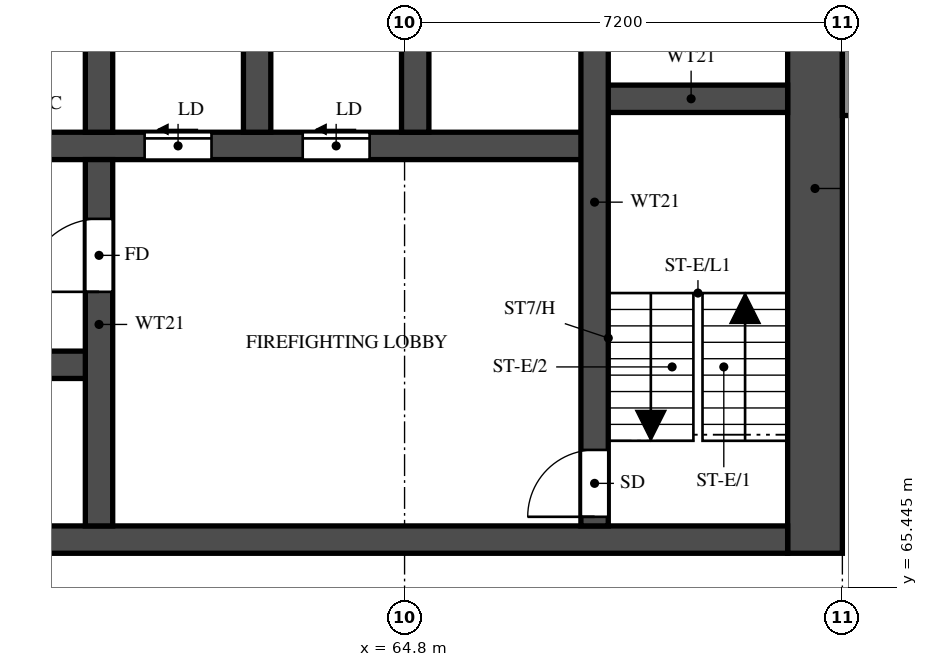
"""IFC4 building model, lengths in metres.
Left out: names, types, materials, properties, quantities, classifications, styles, units other than length and angle.
Written with IfcOpenShell. Run it as: python <this file> out.ifc"""

import sys

from ifc_helpers import new_model, si_unit, direction, frame, frame_2d, origin, place, context, subcontext, project, spatial, rectangle, extrude, element, fill, save


model = new_model("IFC4")
c1 = context("Model", 3, precision=1e-05, world=origin(), true_north=direction((0.0, 1.0)))
c2 = subcontext(c1, "Body", "Model", "MODEL_VIEW")
j1 = project(units=[si_unit("LENGTHUNIT", "METRE"), si_unit("PLANEANGLEUNIT", "RADIAN")], contexts=[c1])
p1 = place(None, origin())
s1 = spatial("IfcSite", under=j1, at=p1, CompositionType="ELEMENT")
p2 = place(p1, origin())
s2 = spatial("IfcBuilding", under=s1, at=p2, CompositionType="ELEMENT")
p3 = place(p2, frame((0.0, 0.0, 93.5)))
s3 = spatial("IfcBuildingStorey", under=s2, at=p3, CompositionType="ELEMENT", Elevation=93.5)
p4 = place(p3, frame((71.55, 66.0, 0.0), z_axis=(0.0, 0.0, 1.0), x_axis=(0.0, 1.0, 0.0)))
e1 = element("IfcWall", 1, at=p4, inside=s3, PredefinedType="SHEAR", context=c2, shape_type="SweptSolid", body=[
    extrude(rectangle(XDim=12.0, YDim=0.9, at=frame_2d((6.0, 0.0))), origin(), (0.0, 0.0, 1.0), 3.18),
])
p5 = place(p3, frame((29.7, 66.225, 0.0), z_axis=(0.0, 0.0, 1.0), x_axis=(1.0, 0.0, 0.0)))
e2 = element("IfcWall", 2, at=p5, inside=s3, PredefinedType="SHEAR", context=c2, shape_type="SweptSolid", body=[
    extrude(rectangle(XDim=41.4, YDim=0.45, at=frame_2d((20.7, 0.0))), origin(), (0.0, 0.0, 1.0), 3.18),
])
p6 = place(p5, frame((0.925, 0.0, 0.0)))
e3 = element("IfcOpeningElement", 3, at=p6, cuts=e2, PredefinedType="OPENING", context=c2, shape_type="SweptSolid", body=[
    extrude(rectangle(XDim=1.1, YDim=2.1, at=frame_2d((0.55, 1.05))), frame((0.0, 0.235, 0.0), z_axis=(0.0, -1.0, 0.0), x_axis=(1.0, 0.0, 0.0)), (0.0, 0.0, 1.0), 0.47),
])
p7 = place(p5, frame((3.738, 0.0, 0.0)))
e4 = element("IfcOpeningElement", 4, at=p7, cuts=e2, PredefinedType="OPENING", context=c2, shape_type="SweptSolid", body=[
    extrude(rectangle(XDim=1.8, YDim=2.1, at=frame_2d((0.9, 1.05))), frame((0.0, 0.235, 0.0), z_axis=(0.0, -1.0, 0.0), x_axis=(1.0, 0.0, 0.0)), (0.0, 0.0, 1.0), 0.47),
])
p8 = place(p3, frame((35.575, 69.1, 0.0), z_axis=(0.0, 0.0, 1.0), x_axis=(1.0, 0.0, 0.0)))
e5 = element("IfcWall", 5, at=p8, inside=s3, PredefinedType="SHEAR", context=c2, shape_type="SweptSolid", body=[
    extrude(rectangle(XDim=24.2, YDim=0.45, at=frame_2d((12.1, 0.0))), origin(), (0.0, 0.0, 1.0), 3.18),
])
p9 = place(p8, frame((1.05, 0.0, 0.0)))
e6 = element("IfcOpeningElement", 6, at=p9, cuts=e5, PredefinedType="OPENING", context=c2, shape_type="SweptSolid", body=[
    extrude(rectangle(XDim=1.1, YDim=2.1, at=frame_2d((0.55, 1.05))), frame((0.0, 0.235, 0.0), z_axis=(0.0, -1.0, 0.0), x_axis=(1.0, 0.0, 0.0)), (0.0, 0.0, 1.0), 0.47),
])
p10 = place(p8, frame((3.8, 0.0, 0.0)))
e7 = element("IfcOpeningElement", 7, at=p10, cuts=e5, PredefinedType="OPENING", context=c2, shape_type="SweptSolid", body=[
    extrude(rectangle(XDim=1.1, YDim=2.1, at=frame_2d((0.55, 1.05))), frame((0.0, 0.235, 0.0), z_axis=(0.0, -1.0, 0.0), x_axis=(1.0, 0.0, 0.0)), (0.0, 0.0, 1.0), 0.47),
])
p11 = place(p8, frame((6.55, 0.0, 0.0)))
e8 = element("IfcOpeningElement", 8, at=p11, cuts=e5, PredefinedType="OPENING", context=c2, shape_type="SweptSolid", body=[
    extrude(rectangle(XDim=1.1, YDim=2.1, at=frame_2d((0.55, 1.05))), frame((0.0, 0.235, 0.0), z_axis=(0.0, -1.0, 0.0), x_axis=(1.0, 0.0, 0.0)), (0.0, 0.0, 1.0), 0.47),
])
p12 = place(p8, frame((9.3, 0.0, 0.0)))
e9 = element("IfcOpeningElement", 9, at=p12, cuts=e5, PredefinedType="OPENING", context=c2, shape_type="SweptSolid", body=[
    extrude(rectangle(XDim=1.1, YDim=2.1, at=frame_2d((0.55, 1.05))), frame((0.0, 0.235, 0.0), z_axis=(0.0, -1.0, 0.0), x_axis=(1.0, 0.0, 0.0)), (0.0, 0.0, 1.0), 0.47),
])
p13 = place(p8, frame((12.05, 0.0, 0.0)))
e10 = element("IfcOpeningElement", 10, at=p13, cuts=e5, PredefinedType="OPENING", context=c2, shape_type="SweptSolid", body=[
    extrude(rectangle(XDim=1.1, YDim=2.1, at=frame_2d((0.55, 1.05))), frame((0.0, 0.235, 0.0), z_axis=(0.0, -1.0, 0.0), x_axis=(1.0, 0.0, 0.0)), (0.0, 0.0, 1.0), 0.47),
])
p14 = place(p8, frame((14.8, 0.0, 0.0)))
e11 = element("IfcOpeningElement", 11, at=p14, cuts=e5, PredefinedType="OPENING", context=c2, shape_type="SweptSolid", body=[
    extrude(rectangle(XDim=1.1, YDim=2.1, at=frame_2d((0.55, 1.05))), frame((0.0, 0.235, 0.0), z_axis=(0.0, -1.0, 0.0), x_axis=(1.0, 0.0, 0.0)), (0.0, 0.0, 1.0), 0.47),
])
p15 = place(p3, frame((32.875, 72.7, 0.0), z_axis=(0.0, 0.0, 1.0), x_axis=(1.0, 0.0, 0.0)))
e12 = element("IfcWall", 12, at=p15, inside=s3, PredefinedType="SHEAR", context=c2, shape_type="SweptSolid", body=[
    extrude(rectangle(XDim=35.05, YDim=0.45, at=frame_2d((17.525, 0.0))), origin(), (0.0, 0.0, 1.0), 3.18),
])
p16 = place(p15, frame((19.8, 0.0, 0.0)))
e13 = element("IfcOpeningElement", 13, at=p16, cuts=e12, PredefinedType="OPENING", context=c2, shape_type="SweptSolid", body=[
    extrude(rectangle(XDim=1.1, YDim=2.1, at=frame_2d((0.55, 1.05))), frame((0.0, 0.235, 0.0), z_axis=(0.0, -1.0, 0.0), x_axis=(1.0, 0.0, 0.0)), (0.0, 0.0, 1.0), 0.47),
])
p17 = place(p15, frame((27.65, 0.0, 0.0)))
e14 = element("IfcOpeningElement", 14, at=p17, cuts=e12, PredefinedType="OPENING", context=c2, shape_type="SweptSolid", body=[
    extrude(rectangle(XDim=1.1, YDim=2.1, at=frame_2d((0.55, 1.05))), frame((0.0, 0.235, 0.0), z_axis=(0.0, -1.0, 0.0), x_axis=(1.0, 0.0, 0.0)), (0.0, 0.0, 1.0), 0.47),
])
p18 = place(p15, frame((30.25, 0.0, 0.0)))
e15 = element("IfcOpeningElement", 15, at=p18, cuts=e12, PredefinedType="OPENING", context=c2, shape_type="SweptSolid", body=[
    extrude(rectangle(XDim=1.1, YDim=2.1, at=frame_2d((0.55, 1.05))), frame((0.0, 0.235, 0.0), z_axis=(0.0, -1.0, 0.0), x_axis=(1.0, 0.0, 0.0)), (0.0, 0.0, 1.0), 0.47),
])
p19 = place(p15, frame((3.75, 0.0, 0.0)))
e16 = element("IfcOpeningElement", 16, at=p19, cuts=e12, PredefinedType="OPENING", context=c2, shape_type="SweptSolid", body=[
    extrude(rectangle(XDim=1.1, YDim=2.1, at=frame_2d((0.55, 1.05))), frame((0.0, 0.235, 0.0), z_axis=(0.0, -1.0, 0.0), x_axis=(1.0, 0.0, 0.0)), (0.0, 0.0, 1.0), 0.47),
])
p20 = place(p15, frame((6.5, 0.0, 0.0)))
e17 = element("IfcOpeningElement", 17, at=p20, cuts=e12, PredefinedType="OPENING", context=c2, shape_type="SweptSolid", body=[
    extrude(rectangle(XDim=1.1, YDim=2.1, at=frame_2d((0.55, 1.05))), frame((0.0, 0.235, 0.0), z_axis=(0.0, -1.0, 0.0), x_axis=(1.0, 0.0, 0.0)), (0.0, 0.0, 1.0), 0.47),
])
p21 = place(p15, frame((9.25, 0.0, 0.0)))
e18 = element("IfcOpeningElement", 18, at=p21, cuts=e12, PredefinedType="OPENING", context=c2, shape_type="SweptSolid", body=[
    extrude(rectangle(XDim=1.1, YDim=2.1, at=frame_2d((0.55, 1.05))), frame((0.0, 0.235, 0.0), z_axis=(0.0, -1.0, 0.0), x_axis=(1.0, 0.0, 0.0)), (0.0, 0.0, 1.0), 0.47),
])
p22 = place(p15, frame((12.0, 0.0, 0.0)))
e19 = element("IfcOpeningElement", 19, at=p22, cuts=e12, PredefinedType="OPENING", context=c2, shape_type="SweptSolid", body=[
    extrude(rectangle(XDim=1.1, YDim=2.1, at=frame_2d((0.55, 1.05))), frame((0.0, 0.235, 0.0), z_axis=(0.0, -1.0, 0.0), x_axis=(1.0, 0.0, 0.0)), (0.0, 0.0, 1.0), 0.47),
])
p23 = place(p15, frame((14.75, 0.0, 0.0)))
e20 = element("IfcOpeningElement", 20, at=p23, cuts=e12, PredefinedType="OPENING", context=c2, shape_type="SweptSolid", body=[
    extrude(rectangle(XDim=1.1, YDim=2.1, at=frame_2d((0.55, 1.05))), frame((0.0, 0.235, 0.0), z_axis=(0.0, -1.0, 0.0), x_axis=(1.0, 0.0, 0.0)), (0.0, 0.0, 1.0), 0.47),
])
p24 = place(p15, frame((17.5, 0.0, 0.0)))
e21 = element("IfcOpeningElement", 21, at=p24, cuts=e12, PredefinedType="OPENING", context=c2, shape_type="SweptSolid", body=[
    extrude(rectangle(XDim=1.1, YDim=2.1, at=frame_2d((0.55, 1.05))), frame((0.0, 0.235, 0.0), z_axis=(0.0, -1.0, 0.0), x_axis=(1.0, 0.0, 0.0)), (0.0, 0.0, 1.0), 0.47),
])
p25 = place(p15, frame((0.913, 0.0, 0.0)))
e22 = element("IfcOpeningElement", 22, at=p25, cuts=e12, PredefinedType="OPENING", context=c2, shape_type="SweptSolid", body=[
    extrude(rectangle(XDim=1.1, YDim=2.1, at=frame_2d((0.55, 1.05))), frame((0.0, 0.235, 0.0), z_axis=(0.0, -1.0, 0.0), x_axis=(1.0, 0.0, 0.0)), (0.0, 0.0, 1.0), 0.47),
])
p26 = place(p3, frame((67.925, 73.475, 0.0), z_axis=(0.0, 0.0, 1.0), x_axis=(1.0, 0.0, 0.0)))
e23 = element("IfcWall", 23, at=p26, inside=s3, PredefinedType="SHEAR", context=c2, shape_type="SweptSolid", body=[
    extrude(rectangle(XDim=3.175, YDim=0.45, at=frame_2d((1.587, 0.0))), origin(), (0.0, 0.0, 1.0), 3.18),
])
p27 = place(p3, frame((67.925, 66.45, 0.0), z_axis=(0.0, 0.0, 1.0), x_axis=(0.0, 1.0, 0.0)))
e24 = element("IfcWall", 24, at=p27, inside=s3, PredefinedType="SHEAR", context=c2, shape_type="SweptSolid", body=[
    extrude(rectangle(XDim=10.65, YDim=0.45, at=frame_2d((5.325, 0.0))), origin(), (0.0, 0.0, 1.0), 3.18),
])
p28 = place(p27, frame((0.15, 0.0, 0.0)))
e25 = element("IfcOpeningElement", 25, at=p28, cuts=e24, PredefinedType="OPENING", context=c2, shape_type="SweptSolid", body=[
    extrude(rectangle(XDim=1.1, YDim=2.1, at=frame_2d((0.55, 1.05))), frame((0.0, 0.235, 0.0), z_axis=(0.0, -1.0, 0.0), x_axis=(1.0, 0.0, 0.0)), (0.0, 0.0, 1.0), 0.47),
])
p29 = place(p3, frame((59.775, 66.45, 0.0), z_axis=(0.0, 0.0, 1.0), x_axis=(0.0, 1.0, 0.0)))
e26 = element("IfcWall", 26, at=p29, inside=s3, PredefinedType="SHEAR", context=c2, shape_type="SweptSolid", body=[
    extrude(rectangle(XDim=6.025, YDim=0.45, at=frame_2d((3.013, 0.0))), origin(), (0.0, 0.0, 1.0), 3.18),
])
p30 = place(p29, frame((3.85, 0.0, 0.0)))
e27 = element("IfcOpeningElement", 27, at=p30, cuts=e26, PredefinedType="OPENING", context=c2, shape_type="SweptSolid", body=[
    extrude(rectangle(XDim=1.2, YDim=2.1, at=frame_2d((0.6, 1.05))), frame((0.0, 0.235, 0.0), z_axis=(0.0, -1.0, 0.0), x_axis=(1.0, 0.0, 0.0)), (0.0, 0.0, 1.0), 0.47),
])
for number, where, z_axis, x_axis in (
    (28, (59.775, 72.925, 0.0), (0.0, 0.0, 1.0), (0.0, 1.0, 0.0)),
    (29, (62.375, 72.925, 0.0), (0.0, 0.0, 1.0), (0.0, 1.0, 0.0)),
    (30, (64.975, 72.925, 0.0), (0.0, 0.0, 1.0), (0.0, 1.0, 0.0)),
):
    element("IfcWall", number, at=place(p3, frame(where, z_axis=z_axis, x_axis=x_axis)), inside=s3, PredefinedType="SHEAR", context=c2, shape_type="SweptSolid", body=[
        extrude(rectangle(XDim=2.95, YDim=0.45, at=frame_2d((1.475, 0.0))), origin(), (0.0, 0.0, 1.0), 3.18),
    ])
p31 = place(p3, frame((72.1, 73.2, 0.0), z_axis=(0.0, 0.0, 1.0), x_axis=(0.0, 1.0, 0.0)))
e31 = element("IfcWall", 31, at=p31, inside=s3, PredefinedType="SOLIDWALL", context=c2, shape_type="SweptSolid", body=[
    extrude(rectangle(XDim=4.8, YDim=0.2, at=frame_2d((2.4, 0.0))), origin(), (0.0, 0.0, 1.0), 3.18),
])
p32 = place(p28, origin())
e32 = element("IfcDoor", 32, at=p32, inside=s3, OperationType="SINGLE_SWING_LEFT", PredefinedType="DOOR", context=c2, shape_type="SweptSolid", body=[
    extrude(rectangle(XDim=1.1, YDim=2.1, at=frame_2d((0.55, 1.05))), frame((0.0, 0.025, 0.0), z_axis=(0.0, -1.0, 0.0), x_axis=(1.0, 0.0, 0.0)), (0.0, 0.0, 1.0), 0.05),
])
fill(e25, e32)
p33 = place(p30, origin())
e33 = element("IfcDoor", 33, at=p33, inside=s3, OperationType="SINGLE_SWING_RIGHT", PredefinedType="DOOR", context=c2, shape_type="SweptSolid", body=[
    extrude(rectangle(XDim=1.2, YDim=2.1, at=frame_2d((0.6, 1.05))), frame((0.0, 0.025, 0.0), z_axis=(0.0, -1.0, 0.0), x_axis=(1.0, 0.0, 0.0)), (0.0, 0.0, 1.0), 0.05),
])
fill(e27, e33)
p34 = place(p17, origin())
e34 = element("IfcDoor", 34, at=p34, inside=s3, OperationType="SLIDING_TO_LEFT", PredefinedType="DOOR", context=c2, shape_type="SweptSolid", body=[
    extrude(rectangle(XDim=1.1, YDim=2.1, at=frame_2d((0.55, 1.05))), frame((0.0, 0.025, 0.0), z_axis=(0.0, -1.0, 0.0), x_axis=(1.0, 0.0, 0.0)), (0.0, 0.0, 1.0), 0.05),
])
fill(e14, e34)
p35 = place(p18, origin())
e35 = element("IfcDoor", 35, at=p35, inside=s3, OperationType="SLIDING_TO_LEFT", PredefinedType="DOOR", context=c2, shape_type="SweptSolid", body=[
    extrude(rectangle(XDim=1.1, YDim=2.1, at=frame_2d((0.55, 1.05))), frame((0.0, 0.025, 0.0), z_axis=(0.0, -1.0, 0.0), x_axis=(1.0, 0.0, 0.0)), (0.0, 0.0, 1.0), 0.05),
])
fill(e15, e35)
save(model, sys.argv[1])
